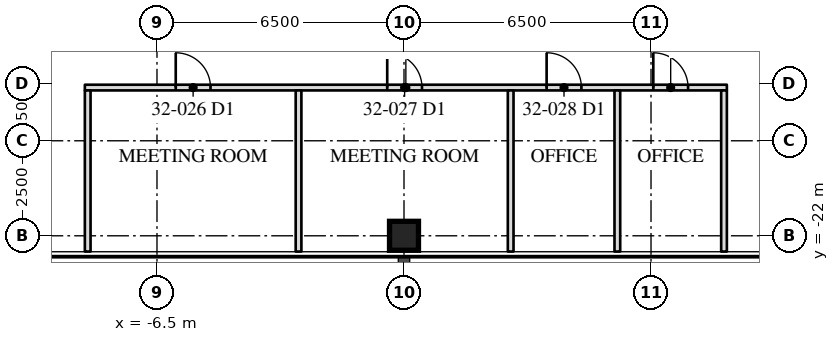
"""IFC4 building model, lengths in metres.
Left out: names, types, materials, properties, quantities, classifications, styles, units other than length and angle.
Written with IfcOpenShell. Run it as: python <this file> out.ifc"""

import sys

from ifc_helpers import new_model, si_unit, direction, frame, frame_2d, origin, origin_2d, place, context, subcontext, project, spatial, rectangle, hollow_rectangle, extrude, element, fill, save


model = new_model("IFC4")
c1 = context("Model", 3, precision=1e-05, world=origin(), true_north=direction((0.0, 1.0)))
c2 = subcontext(c1, "Body", "Model", "MODEL_VIEW")
j1 = project(units=[si_unit("LENGTHUNIT", "METRE"), si_unit("PLANEANGLEUNIT", "RADIAN")], contexts=[c1])
p1 = place(None, origin())
s1 = spatial("IfcSite", under=j1, at=p1, CompositionType="ELEMENT")
p2 = place(p1, origin())
s2 = spatial("IfcBuilding", under=s1, at=p2, CompositionType="ELEMENT")
p3 = place(p2, frame((0.0, 0.0, 137.7)))
s3 = spatial("IfcBuildingStorey", under=s2, at=p3, CompositionType="ELEMENT", Elevation=137.7)
p4 = place(p3, frame((0.0, -22.0, 0.0), z_axis=(0.0, 0.0, 1.0), x_axis=(1.0, 0.0, 0.0)))
e1 = element("IfcColumn", 1, at=p4, inside=s3, PredefinedType="COLUMN", context=c2, shape_type="SweptSolid", body=[
    extrude(hollow_rectangle(XDim=0.762, YDim=0.762, WallThickness=0.076, at=origin_2d()), origin(), (0.0, 0.0, 1.0), 4.1),
])
p5 = place(p3, frame((-8.398, -18.1, 0.0), z_axis=(0.0, 0.0, 1.0), x_axis=(1.0, 0.0, 0.0)))
e2 = element("IfcWall", 2, at=p5, inside=s3, PredefinedType="PARTITIONING", context=c2, shape_type="SweptSolid", body=[
    extrude(rectangle(XDim=16.894, YDim=0.15, at=frame_2d((8.447, 0.0))), origin(), (0.0, 0.0, 1.0), 3.91),
])
p6 = place(p5, frame((2.392, 0.0, 0.0)))
e3 = element("IfcOpeningElement", 3, at=p6, cuts=e2, PredefinedType="OPENING", context=c2, shape_type="SweptSolid", body=[
    extrude(rectangle(XDim=0.915, YDim=2.134, at=frame_2d((0.458, 1.067))), frame((0.0, 0.085, 0.0), z_axis=(0.0, -1.0, 0.0), x_axis=(1.0, 0.0, 0.0)), (0.0, 0.0, 1.0), 0.17),
])
p7 = place(p5, frame((7.957, 0.0, 0.0)))
e4 = element("IfcOpeningElement", 4, at=p7, cuts=e2, PredefinedType="OPENING", context=c2, shape_type="SweptSolid", body=[
    extrude(rectangle(XDim=0.915, YDim=2.134, at=frame_2d((0.458, 1.067))), frame((0.0, 0.085, 0.0), z_axis=(0.0, -1.0, 0.0), x_axis=(1.0, 0.0, 0.0)), (0.0, 0.0, 1.0), 0.17),
])
p8 = place(p5, frame((12.151, 0.0, 0.0)))
e5 = element("IfcOpeningElement", 5, at=p8, cuts=e2, PredefinedType="OPENING", context=c2, shape_type="SweptSolid", body=[
    extrude(rectangle(XDim=0.915, YDim=2.134, at=frame_2d((0.458, 1.067))), frame((0.0, 0.085, 0.0), z_axis=(0.0, -1.0, 0.0), x_axis=(1.0, 0.0, 0.0)), (0.0, 0.0, 1.0), 0.17),
])
p9 = place(p5, frame((14.958, 0.0, 0.0)))
e6 = element("IfcOpeningElement", 6, at=p9, cuts=e2, PredefinedType="OPENING", context=c2, shape_type="SweptSolid", body=[
    extrude(rectangle(XDim=0.915, YDim=2.134, at=frame_2d((0.458, 1.067))), frame((0.0, 0.085, 0.0), z_axis=(0.0, -1.0, 0.0), x_axis=(1.0, 0.0, 0.0)), (0.0, 0.0, 1.0), 0.17),
])
for number, where, z_axis, x_axis in (
    (7, (-8.323, -18.175, 0.0), (0.0, 0.0, 1.0), (0.0, -1.0, 0.0)),
    (8, (-2.775, -18.175, 0.0), (0.0, 0.0, 1.0), (0.0, -1.0, 0.0)),
    (9, (2.807, -18.175, 0.0), (0.0, 0.0, 1.0), (0.0, -1.0, 0.0)),
    (10, (5.614, -18.175, 0.0), (0.0, 0.0, 1.0), (0.0, -1.0, 0.0)),
    (11, (8.421, -18.175, 0.0), (0.0, 0.0, 1.0), (0.0, -1.0, 0.0)),
):
    element("IfcWall", number, at=place(p3, frame(where, z_axis=z_axis, x_axis=x_axis)), inside=s3, PredefinedType="PARTITIONING", context=c2, shape_type="SweptSolid", body=[
        extrude(rectangle(XDim=4.24, YDim=0.15, at=frame_2d((2.12, 0.0))), origin(), (0.0, 0.0, 1.0), 3.91),
    ])
p10 = place(p6, origin())
e12 = element("IfcDoor", 12, at=p10, inside=s3, OperationType="SINGLE_SWING_LEFT", PredefinedType="DOOR", context=c2, shape_type="SweptSolid", body=[
    extrude(rectangle(XDim=0.915, YDim=2.134, at=frame_2d((0.458, 1.067))), frame((0.0, 0.025, 0.0), z_axis=(0.0, -1.0, 0.0), x_axis=(1.0, 0.0, 0.0)), (0.0, 0.0, 1.0), 0.05),
])
fill(e3, e12)
p11 = place(p7, origin())
e13 = element("IfcDoor", 13, at=p11, inside=s3, OperationType="SINGLE_SWING_LEFT", PredefinedType="DOOR", context=c2, shape_type="SweptSolid", body=[
    extrude(rectangle(XDim=0.915, YDim=2.134, at=frame_2d((0.458, 1.067))), frame((0.0, 0.025, 0.0), z_axis=(0.0, -1.0, 0.0), x_axis=(1.0, 0.0, 0.0)), (0.0, 0.0, 1.0), 0.05),
])
fill(e4, e13)
p12 = place(p8, origin())
e14 = element("IfcDoor", 14, at=p12, inside=s3, OperationType="SINGLE_SWING_LEFT", PredefinedType="DOOR", context=c2, shape_type="SweptSolid", body=[
    extrude(rectangle(XDim=0.915, YDim=2.134, at=frame_2d((0.458, 1.067))), frame((0.0, 0.025, 0.0), z_axis=(0.0, -1.0, 0.0), x_axis=(1.0, 0.0, 0.0)), (0.0, 0.0, 1.0), 0.05),
])
fill(e5, e14)
p13 = place(p9, origin())
e15 = element("IfcDoor", 15, at=p13, inside=s3, OperationType="SINGLE_SWING_LEFT", PredefinedType="DOOR", context=c2, shape_type="SweptSolid", body=[
    extrude(rectangle(XDim=0.915, YDim=2.134, at=frame_2d((0.458, 1.067))), frame((0.0, 0.025, 0.0), z_axis=(0.0, -1.0, 0.0), x_axis=(1.0, 0.0, 0.0)), (0.0, 0.0, 1.0), 0.05),
])
fill(e6, e15)
save(model, sys.argv[1])
